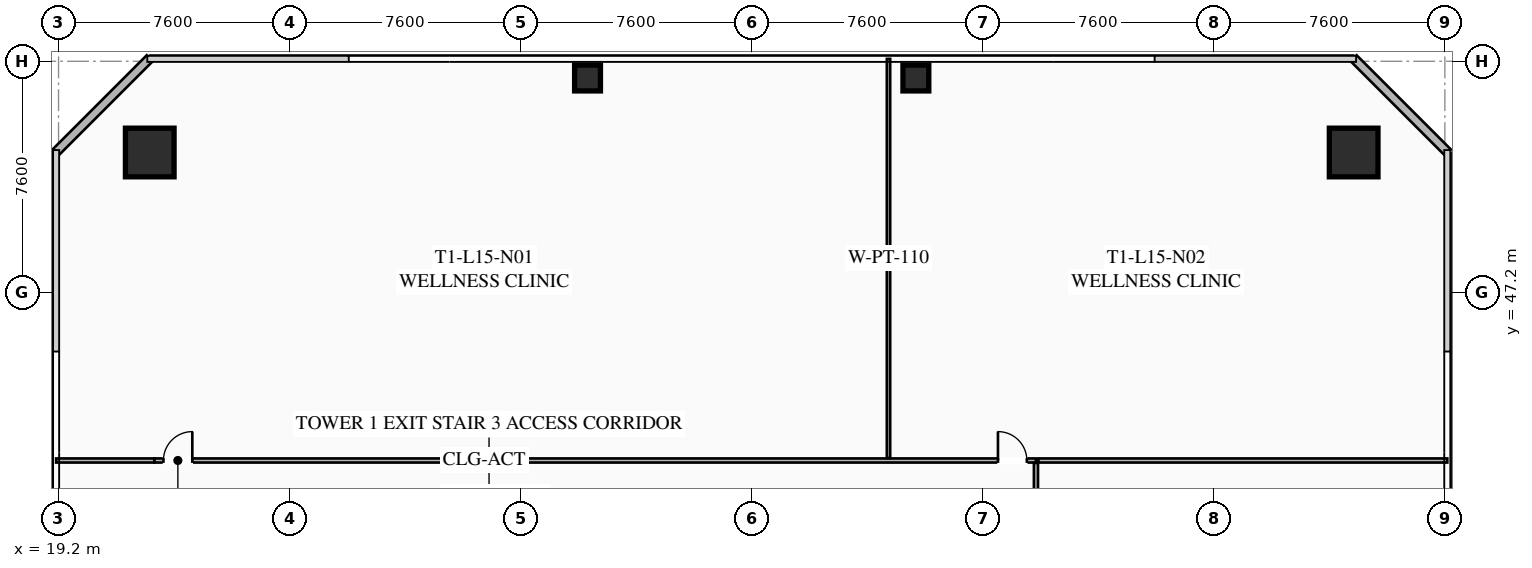
"""IFC4 building model, lengths in metres.
Left out: names, types, materials, properties, quantities, classifications, styles, units other than length and angle.
Written with IfcOpenShell. Run it as: python <this file> out.ifc"""

import sys

from ifc_helpers import new_model, si_unit, direction, frame, frame_2d, origin, origin_2d, place, context, subcontext, project, spatial, rectangle, hollow_rectangle, extrude, element, fill, save


model = new_model("IFC4")
c1 = context("Model", 3, precision=1e-05, world=origin(), true_north=direction((0.0, 1.0)))
c2 = subcontext(c1, "Body", "Model", "MODEL_VIEW")
j1 = project(units=[si_unit("LENGTHUNIT", "METRE"), si_unit("PLANEANGLEUNIT", "RADIAN")], contexts=[c1])
p1 = place(None, origin())
s1 = spatial("IfcSite", under=j1, at=p1, CompositionType="ELEMENT")
p2 = place(p1, origin())
s2 = spatial("IfcBuilding", under=s1, at=p2, CompositionType="ELEMENT")
p3 = place(p2, frame((0.0, 0.0, 60.1)))
s3 = spatial("IfcBuildingStorey", under=s2, at=p3, CompositionType="ELEMENT", Elevation=60.1)
for number, where, z_axis, x_axis in (
    (1, (61.8, 51.8, 0.0), (0.0, 0.0, 1.0), (1.0, 0.0, 0.0)),
    (2, (22.2, 51.8, 0.0), (0.0, 0.0, 1.0), (1.0, 0.0, 0.0)),
):
    element("IfcColumn", number, at=place(p3, frame(where, z_axis=z_axis, x_axis=x_axis)), inside=s3, PredefinedType="COLUMN", context=c2, shape_type="SweptSolid", body=[
        extrude(hollow_rectangle(XDim=1.6, YDim=1.6, WallThickness=0.06, at=origin_2d()), origin(), (0.0, 0.0, 1.0), 3.35),
    ])
for number, where, z_axis, x_axis in (
    (3, (47.4, 54.25, 0.0), (0.0, 0.0, 1.0), (1.0, 0.0, 0.0)),
    (4, (36.6, 54.25, 0.0), (0.0, 0.0, 1.0), (1.0, 0.0, 0.0)),
):
    element("IfcColumn", number, at=place(p3, frame(where, z_axis=z_axis, x_axis=x_axis)), inside=s3, PredefinedType="COLUMN", context=c2, shape_type="SweptSolid", body=[
        extrude(hollow_rectangle(XDim=0.85, YDim=0.85, WallThickness=0.035, at=origin_2d()), origin(), (0.0, 0.0, 1.0), 3.35),
    ])
for number, where, z_axis, x_axis in (
    (5, (19.1, 51.8, 0.0), (0.0, 0.0, 1.0), (0.707, 0.707, 0.0)),
    (6, (61.8, 54.9, 0.0), (0.0, 0.0, 1.0), (0.707, -0.707, 0.0)),
):
    element("IfcWall", number, at=place(p3, frame(where, z_axis=z_axis, x_axis=x_axis)), inside=s3, PredefinedType="SOLIDWALL", context=c2, shape_type="SweptSolid", body=[
        extrude(rectangle(XDim=4.384, YDim=0.28, at=frame_2d((2.192, 0.0))), origin(), (0.0, 0.0, 1.0), 3.35),
    ])
p4 = place(p3, frame((22.35, 41.67, 0.0), z_axis=(0.0, 0.0, 1.0), x_axis=(1.0, 0.0, 0.0)))
e7 = element("IfcWall", 7, at=p4, inside=s3, PredefinedType="PARTITIONING", context=c2, shape_type="SweptSolid", body=[
    extrude(rectangle(XDim=29.0, YDim=0.135, at=frame_2d((14.5, 0.0))), origin(), (0.0, 0.0, 1.0), 2.703),
])
p5 = place(p4, frame((0.3, 0.0, 0.0)))
e8 = element("IfcOpeningElement", 8, at=p5, cuts=e7, PredefinedType="OPENING", context=c2, shape_type="SweptSolid", body=[
    extrude(rectangle(XDim=0.95, YDim=2.05, at=frame_2d((0.475, 1.025))), frame((0.0, 0.077, 0.0), z_axis=(0.0, -1.0, 0.0), x_axis=(1.0, 0.0, 0.0)), (0.0, 0.0, 1.0), 0.155),
])
p6 = place(p4, frame((27.75, 0.0, 0.0)))
e9 = element("IfcOpeningElement", 9, at=p6, cuts=e7, PredefinedType="OPENING", context=c2, shape_type="SweptSolid", body=[
    extrude(rectangle(XDim=0.95, YDim=2.05, at=frame_2d((0.475, 1.025))), frame((0.0, 0.077, 0.0), z_axis=(0.0, -1.0, 0.0), x_axis=(1.0, 0.0, 0.0)), (0.0, 0.0, 1.0), 0.155),
])
p7 = place(p3, frame((19.12, 41.67, 0.0), z_axis=(0.0, 0.0, 1.0), x_axis=(1.0, 0.0, 0.0)))
e10 = element("IfcWall", 10, at=p7, inside=s3, PredefinedType="PARTITIONING", context=c2, shape_type="SweptSolid", body=[
    extrude(rectangle(XDim=3.23, YDim=0.135, at=frame_2d((1.615, 0.0))), origin(), (0.0, 0.0, 1.0), 2.703),
])
p8 = place(p3, frame((46.5, 41.75, 0.0), z_axis=(0.0, 0.0, 1.0), x_axis=(0.0, 1.0, 0.0)))
e11 = element("IfcWall", 11, at=p8, inside=s3, PredefinedType="PARTITIONING", context=c2, shape_type="SweptSolid", body=[
    extrude(rectangle(XDim=13.13, YDim=0.11, at=frame_2d((6.565, 0.0))), origin(), (0.0, 0.0, 1.0), 2.703),
])
p9 = place(p3, frame((51.35, 41.59, 0.0), z_axis=(0.0, 0.0, 1.0), x_axis=(0.0, -1.0, 0.0)))
e12 = element("IfcWall", 12, at=p9, inside=s3, PredefinedType="PARTITIONING", context=c2, shape_type="SweptSolid", body=[
    extrude(rectangle(XDim=18.86, YDim=0.135, at=frame_2d((9.43, 0.0))), origin(), (0.0, 0.0, 1.0), 2.703),
])
p10 = place(p9, frame((8.83, 0.0, 0.0)))
e13 = element("IfcOpeningElement", 13, at=p10, cuts=e12, PredefinedType="OPENING", context=c2, shape_type="SweptSolid", body=[
    extrude(rectangle(XDim=0.95, YDim=2.05, at=frame_2d((0.475, 1.025))), frame((0.0, 0.077, 0.0), z_axis=(0.0, -1.0, 0.0), x_axis=(1.0, 0.0, 0.0)), (0.0, 0.0, 1.0), 0.155),
])
p11 = place(p3, frame((64.88, 41.67, 0.0), z_axis=(0.0, 0.0, 1.0), x_axis=(-1.0, 0.0, 0.0)))
e14 = element("IfcWall", 14, at=p11, inside=s3, PredefinedType="PARTITIONING", context=c2, shape_type="SweptSolid", body=[
    extrude(rectangle(XDim=13.45, YDim=0.135, at=frame_2d((6.725, 0.0))), origin(), (0.0, 0.0, 1.0), 2.703),
])
p12 = place(p5, origin())
e15 = element("IfcDoor", 15, at=p12, inside=s3, OperationType="SINGLE_SWING_RIGHT", PredefinedType="DOOR", context=c2, shape_type="SweptSolid", body=[
    extrude(rectangle(XDim=0.95, YDim=2.05, at=frame_2d((0.475, 1.025))), frame((0.0, 0.025, 0.0), z_axis=(0.0, -1.0, 0.0), x_axis=(1.0, 0.0, 0.0)), (0.0, 0.0, 1.0), 0.05),
])
fill(e8, e15)
p13 = place(p6, origin())
e16 = element("IfcDoor", 16, at=p13, inside=s3, OperationType="SINGLE_SWING_LEFT", PredefinedType="DOOR", context=c2, shape_type="SweptSolid", body=[
    extrude(rectangle(XDim=0.95, YDim=2.05, at=frame_2d((0.475, 1.025))), frame((0.0, 0.025, 0.0), z_axis=(0.0, -1.0, 0.0), x_axis=(1.0, 0.0, 0.0)), (0.0, 0.0, 1.0), 0.05),
])
fill(e9, e16)
save(model, sys.argv[1])
